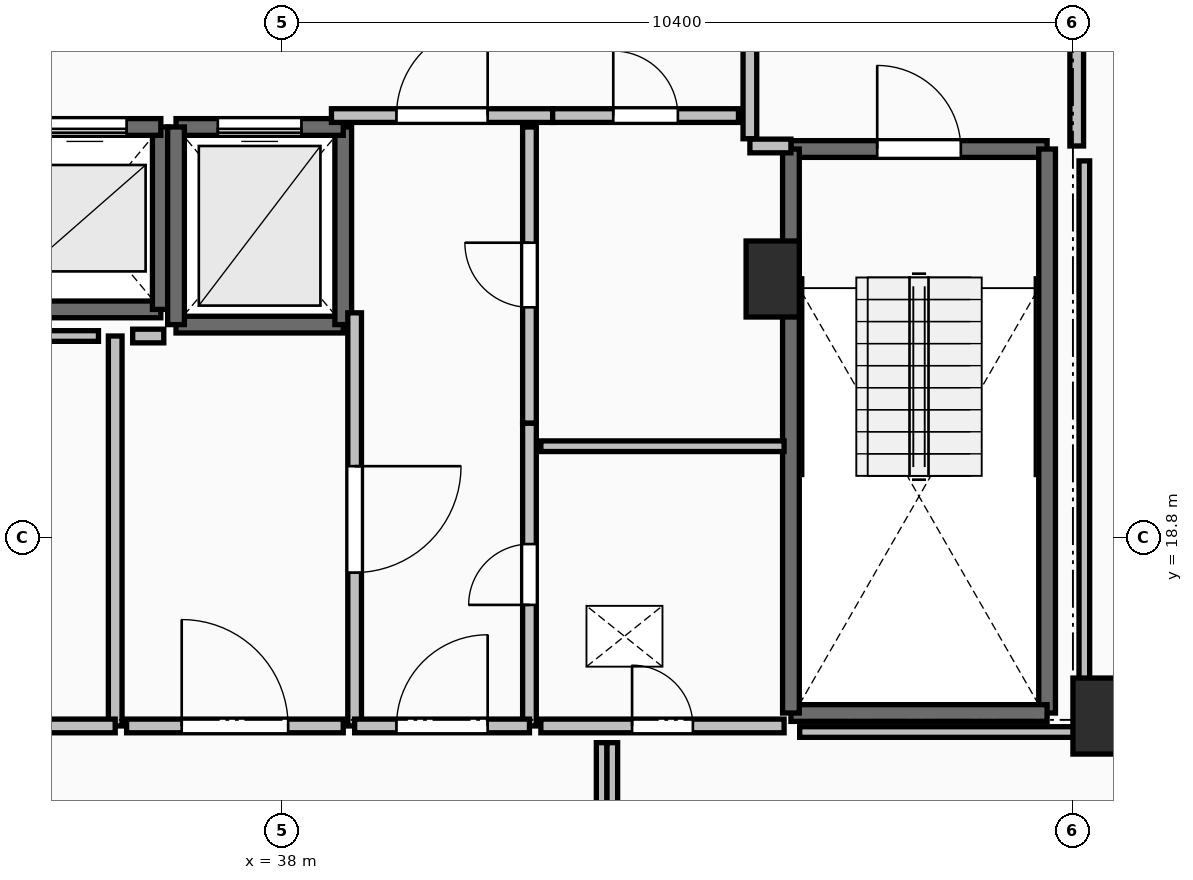
"""IFC4 building model, lengths in metres.
Left out: names, types, materials, properties, quantities, classifications, styles, units other than length and angle.
Written with IfcOpenShell. Run it as: python <this file> out.ifc"""

import sys

from ifc_helpers import new_model, si_unit, direction, frame, frame_2d, origin, origin_2d, place, context, subcontext, project, spatial, rectangle, extrude, element, fill, save


model = new_model("IFC4")
c1 = context("Model", 3, precision=1e-05, world=origin(), true_north=direction((0.0, 1.0)))
c2 = subcontext(c1, "Body", "Model", "MODEL_VIEW")
j1 = project(units=[si_unit("LENGTHUNIT", "METRE"), si_unit("PLANEANGLEUNIT", "RADIAN")], contexts=[c1])
p1 = place(None, origin())
s1 = spatial("IfcSite", under=j1, at=p1, CompositionType="ELEMENT")
p2 = place(p1, origin())
s2 = spatial("IfcBuilding", under=s1, at=p2, CompositionType="ELEMENT")
p3 = place(p2, frame((0.0, 0.0, 193.1)))
s3 = spatial("IfcBuildingStorey", under=s2, at=p3, CompositionType="ELEMENT", Elevation=193.1)
for number, where, z_axis, x_axis in (
    (1, (48.75, 16.45, 0.0), (0.0, 0.0, 1.0), (1.0, 0.0, 0.0)),
    (2, (44.45, 22.2, 0.0), (0.0, 0.0, 1.0), (1.0, 0.0, 0.0)),
):
    element("IfcColumn", number, at=place(p3, frame(where, z_axis=z_axis, x_axis=x_axis)), inside=s3, PredefinedType="PILASTER", context=c2, shape_type="SweptSolid", body=[
        extrude(rectangle(XDim=0.7, YDim=1.0, at=origin_2d()), origin(), (0.0, 0.0, 1.0), 3.5),
    ])
p4 = place(p3, frame((44.69, 23.91, 0.0), z_axis=(0.0, 0.0, 1.0), x_axis=(1.0, 0.0, 0.0)))
e3 = element("IfcWall", 3, at=p4, inside=s3, PredefinedType="SOLIDWALL", context=c2, shape_type="SweptSolid", body=[
    extrude(rectangle(XDim=3.37, YDim=0.22, at=frame_2d((1.685, 0.0))), origin(), (0.0, 0.0, 1.0), 3.24),
])
p5 = place(p4, frame((1.135, 0.0, 0.0)))
e4 = element("IfcOpeningElement", 4, at=p5, cuts=e3, PredefinedType="OPENING", context=c2, shape_type="SweptSolid", body=[
    extrude(rectangle(XDim=1.1, YDim=2.15, at=frame_2d((0.55, 1.075))), frame((0.0, 0.125, 0.0), z_axis=(0.0, -1.0, 0.0), x_axis=(1.0, 0.0, 0.0)), (0.0, 0.0, 1.0), 0.25),
])
p6 = place(p3, frame((48.06, 23.91, 0.0), z_axis=(0.0, 0.0, 1.0), x_axis=(0.0, -1.0, 0.0)))
e5 = element("IfcWall", 5, at=p6, inside=s3, PredefinedType="SOLIDWALL", context=c2, shape_type="SweptSolid", body=[
    extrude(rectangle(XDim=7.42, YDim=0.22, at=frame_2d((3.71, 0.0))), origin(), (0.0, 0.0, 1.0), 3.24),
])
p7 = place(p3, frame((48.06, 16.49, 0.0), z_axis=(0.0, 0.0, 1.0), x_axis=(-1.0, 0.0, 0.0)))
e6 = element("IfcWall", 6, at=p7, inside=s3, PredefinedType="SOLIDWALL", context=c2, shape_type="SweptSolid", body=[
    extrude(rectangle(XDim=3.37, YDim=0.22, at=frame_2d((1.685, 0.0))), origin(), (0.0, 0.0, 1.0), 3.24),
])
p8 = place(p3, frame((44.69, 16.49, 0.0), z_axis=(0.0, 0.0, 1.0), x_axis=(0.0, 1.0, 0.0)))
e7 = element("IfcWall", 7, at=p8, inside=s3, PredefinedType="SOLIDWALL", context=c2, shape_type="SweptSolid", body=[
    extrude(rectangle(XDim=7.42, YDim=0.22, at=frame_2d((3.71, 0.0))), origin(), (0.0, 0.0, 1.0), 3.24),
])
p9 = place(p3, frame((34.4, 21.8, 0.0), z_axis=(0.0, 0.0, 1.0), x_axis=(1.0, 0.0, 0.0)))
e8 = element("IfcWall", 8, at=p9, inside=s3, PredefinedType="SOLIDWALL", context=c2, shape_type="SweptSolid", body=[
    extrude(rectangle(XDim=2.0, YDim=0.22, at=frame_2d((1.0, 0.0))), origin(), (0.0, 0.0, 1.0), 3.24),
])
p10 = place(p3, frame((36.4, 21.8, 0.0), z_axis=(0.0, 0.0, 1.0), x_axis=(0.0, 1.0, 0.0)))
e9 = element("IfcWall", 9, at=p10, inside=s3, PredefinedType="SOLIDWALL", context=c2, shape_type="SweptSolid", body=[
    extrude(rectangle(XDim=2.4, YDim=0.22, at=frame_2d((1.2, 0.0))), origin(), (0.0, 0.0, 1.0), 3.24),
])
p11 = place(p3, frame((36.4, 24.2, 0.0), z_axis=(0.0, 0.0, 1.0), x_axis=(-1.0, 0.0, 0.0)))
e10 = element("IfcWall", 10, at=p11, inside=s3, PredefinedType="SOLIDWALL", context=c2, shape_type="SweptSolid", body=[
    extrude(rectangle(XDim=2.0, YDim=0.22, at=frame_2d((1.0, 0.0))), origin(), (0.0, 0.0, 1.0), 3.24),
])
p12 = place(p11, frame((0.45, 0.0, 0.0)))
e11 = element("IfcOpeningElement", 11, at=p12, cuts=e10, PredefinedType="OPENING", context=c2, shape_type="SweptSolid", body=[
    extrude(rectangle(XDim=1.1, YDim=2.2, at=frame_2d((0.55, 1.1))), frame((0.0, 0.125, 0.0), z_axis=(0.0, -1.0, 0.0), x_axis=(1.0, 0.0, 0.0)), (0.0, 0.0, 1.0), 0.25),
])
p13 = place(p3, frame((36.6, 21.6, 0.0), z_axis=(0.0, 0.0, 1.0), x_axis=(1.0, 0.0, 0.0)))
e12 = element("IfcWall", 12, at=p13, inside=s3, PredefinedType="SOLIDWALL", context=c2, shape_type="SweptSolid", body=[
    extrude(rectangle(XDim=2.2, YDim=0.22, at=frame_2d((1.1, 0.0))), origin(), (0.0, 0.0, 1.0), 3.24),
])
p14 = place(p3, frame((38.8, 21.6, 0.0), z_axis=(0.0, 0.0, 1.0), x_axis=(0.0, 1.0, 0.0)))
e13 = element("IfcWall", 13, at=p14, inside=s3, PredefinedType="SOLIDWALL", context=c2, shape_type="SweptSolid", body=[
    extrude(rectangle(XDim=2.6, YDim=0.22, at=frame_2d((1.3, 0.0))), origin(), (0.0, 0.0, 1.0), 3.24),
])
p15 = place(p3, frame((38.8, 24.2, 0.0), z_axis=(0.0, 0.0, 1.0), x_axis=(-1.0, 0.0, 0.0)))
e14 = element("IfcWall", 14, at=p15, inside=s3, PredefinedType="SOLIDWALL", context=c2, shape_type="SweptSolid", body=[
    extrude(rectangle(XDim=2.2, YDim=0.22, at=frame_2d((1.1, 0.0))), origin(), (0.0, 0.0, 1.0), 3.24),
])
p16 = place(p15, frame((0.55, 0.0, 0.0)))
e15 = element("IfcOpeningElement", 15, at=p16, cuts=e14, PredefinedType="OPENING", context=c2, shape_type="SweptSolid", body=[
    extrude(rectangle(XDim=1.1, YDim=2.2, at=frame_2d((0.55, 1.1))), frame((0.0, 0.125, 0.0), z_axis=(0.0, -1.0, 0.0), x_axis=(1.0, 0.0, 0.0)), (0.0, 0.0, 1.0), 0.25),
])
p17 = place(p3, frame((36.6, 24.2, 0.0), z_axis=(0.0, 0.0, 1.0), x_axis=(0.0, -1.0, 0.0)))
e16 = element("IfcWall", 16, at=p17, inside=s3, PredefinedType="SOLIDWALL", context=c2, shape_type="SweptSolid", body=[
    extrude(rectangle(XDim=2.6, YDim=0.22, at=frame_2d((1.3, 0.0))), origin(), (0.0, 0.0, 1.0), 3.24),
])
p18 = place(p3, frame((44.15, 27.955, 0.0), z_axis=(0.0, 0.0, 1.0), x_axis=(0.0, -1.0, 0.0)))
e17 = element("IfcWall", 17, at=p18, inside=s3, PredefinedType="PARTITIONING", context=c2, shape_type="SweptSolid", body=[
    extrude(rectangle(XDim=3.91, YDim=0.18, at=frame_2d((1.955, 0.0))), origin(), (0.0, 0.0, 1.0), 3.24),
])
p19 = place(p18, frame((1.355, 0.0, 0.0)))
e18 = element("IfcOpeningElement", 18, at=p19, cuts=e17, PredefinedType="OPENING", context=c2, shape_type="SweptSolid", body=[
    extrude(rectangle(XDim=1.2, YDim=2.15, at=frame_2d((0.6, 1.075))), frame((0.0, 0.105, 0.0), z_axis=(0.0, -1.0, 0.0), x_axis=(1.0, 0.0, 0.0)), (0.0, 0.0, 1.0), 0.21),
])
p20 = place(p3, frame((44.15, 23.95, 0.0), z_axis=(0.0, 0.0, 1.0), x_axis=(1.0, 0.0, 0.0)))
e19 = element("IfcWall", 19, at=p20, inside=s3, PredefinedType="PARTITIONING", context=c2, shape_type="SweptSolid", body=[
    extrude(rectangle(XDim=0.54, YDim=0.18, at=frame_2d((0.27, 0.0))), origin(), (0.0, 0.0, 1.0), 3.24),
])
p21 = place(p3, frame((48.45, 23.95, 0.0), z_axis=(0.0, 0.0, 1.0), x_axis=(0.0, 1.0, 0.0)))
e20 = element("IfcWall", 20, at=p21, inside=s3, PredefinedType="PARTITIONING", context=c2, shape_type="SweptSolid", body=[
    extrude(rectangle(XDim=4.05, YDim=0.18, at=frame_2d((2.025, 0.0))), origin(), (0.0, 0.0, 1.0), 3.24),
])
p22 = place(p21, frame((1.425, 0.0, 0.0)))
e21 = element("IfcOpeningElement", 21, at=p22, cuts=e20, PredefinedType="OPENING", context=c2, shape_type="SweptSolid", body=[
    extrude(rectangle(XDim=1.2, YDim=2.15, at=frame_2d((0.6, 1.075))), frame((0.0, 0.105, 0.0), z_axis=(0.0, -1.0, 0.0), x_axis=(1.0, 0.0, 0.0)), (0.0, 0.0, 1.0), 0.21),
])
p23 = place(p3, frame((38.645, 24.35, 0.0), z_axis=(0.0, 0.0, 1.0), x_axis=(1.0, 0.0, 0.0)))
e22 = element("IfcWall", 22, at=p23, inside=s3, PredefinedType="PARTITIONING", context=c2, shape_type="SweptSolid", body=[
    extrude(rectangle(XDim=2.91, YDim=0.18, at=frame_2d((1.455, 0.0))), origin(), (0.0, 0.0, 1.0), 3.24),
])
p24 = place(p23, frame((0.855, 0.0, 0.0)))
e23 = element("IfcOpeningElement", 23, at=p24, cuts=e22, PredefinedType="OPENING", context=c2, shape_type="SweptSolid", body=[
    extrude(rectangle(XDim=1.2, YDim=2.15, at=frame_2d((0.6, 1.075))), frame((0.0, 0.105, 0.0), z_axis=(0.0, -1.0, 0.0), x_axis=(1.0, 0.0, 0.0)), (0.0, 0.0, 1.0), 0.21),
])
p25 = place(p3, frame((41.555, 24.35, 0.0), z_axis=(0.0, 0.0, 1.0), x_axis=(1.0, 0.0, 0.0)))
e24 = element("IfcWall", 24, at=p25, inside=s3, PredefinedType="PARTITIONING", context=c2, shape_type="SweptSolid", body=[
    extrude(rectangle(XDim=2.445, YDim=0.18, at=frame_2d((1.223, 0.0))), origin(), (0.0, 0.0, 1.0), 3.24),
])
p26 = place(p25, frame((0.798, 0.0, 0.0)))
e25 = element("IfcOpeningElement", 25, at=p26, cuts=e24, PredefinedType="OPENING", context=c2, shape_type="SweptSolid", body=[
    extrude(rectangle(XDim=0.85, YDim=2.1, at=frame_2d((0.425, 1.05))), frame((0.0, 0.105, 0.0), z_axis=(0.0, -1.0, 0.0), x_axis=(1.0, 0.0, 0.0)), (0.0, 0.0, 1.0), 0.21),
])
p27 = place(p3, frame((41.25, 16.32, 0.0), z_axis=(0.0, 0.0, 1.0), x_axis=(0.0, 1.0, 0.0)))
e26 = element("IfcWall", 26, at=p27, inside=s3, PredefinedType="PARTITIONING", context=c2, shape_type="SweptSolid", body=[
    extrude(rectangle(XDim=3.985, YDim=0.18, at=frame_2d((1.992, 0.0))), origin(), (0.0, 0.0, 1.0), 3.24),
])
p28 = place(p27, frame((1.593, 0.0, 0.0)))
e27 = element("IfcOpeningElement", 27, at=p28, cuts=e26, PredefinedType="OPENING", context=c2, shape_type="SweptSolid", body=[
    extrude(rectangle(XDim=0.8, YDim=2.05, at=frame_2d((0.4, 1.025))), frame((0.0, 0.105, 0.0), z_axis=(0.0, -1.0, 0.0), x_axis=(1.0, 0.0, 0.0)), (0.0, 0.0, 1.0), 0.21),
])
p29 = place(p3, frame((41.25, 20.305, 0.0), z_axis=(0.0, 0.0, 1.0), x_axis=(0.0, 1.0, 0.0)))
e28 = element("IfcWall", 28, at=p29, inside=s3, PredefinedType="PARTITIONING", context=c2, shape_type="SweptSolid", body=[
    extrude(rectangle(XDim=3.895, YDim=0.18, at=frame_2d((1.948, 0.0))), origin(), (0.0, 0.0, 1.0), 3.24),
])
p30 = place(p29, frame((1.522, 0.0, 0.0)))
e29 = element("IfcOpeningElement", 29, at=p30, cuts=e28, PredefinedType="OPENING", context=c2, shape_type="SweptSolid", body=[
    extrude(rectangle(XDim=0.85, YDim=2.1, at=frame_2d((0.425, 1.05))), frame((0.0, 0.105, 0.0), z_axis=(0.0, -1.0, 0.0), x_axis=(1.0, 0.0, 0.0)), (0.0, 0.0, 1.0), 0.21),
])
p31 = place(p3, frame((38.95, 21.755, 0.0), z_axis=(0.0, 0.0, 1.0), x_axis=(0.0, -1.0, 0.0)))
e30 = element("IfcWall", 30, at=p31, inside=s3, PredefinedType="PARTITIONING", context=c2, shape_type="SweptSolid", body=[
    extrude(rectangle(XDim=5.435, YDim=0.18, at=frame_2d((2.717, 0.0))), origin(), (0.0, 0.0, 1.0), 3.24),
])
p32 = place(p31, frame((2.018, 0.0, 0.0)))
e31 = element("IfcOpeningElement", 31, at=p32, cuts=e30, PredefinedType="OPENING", context=c2, shape_type="SweptSolid", body=[
    extrude(rectangle(XDim=1.4, YDim=2.2, at=frame_2d((0.7, 1.1))), frame((0.0, 0.105, 0.0), z_axis=(0.0, -1.0, 0.0), x_axis=(1.0, 0.0, 0.0)), (0.0, 0.0, 1.0), 0.21),
])
p33 = place(p3, frame((38.95, 16.32, 0.0), z_axis=(0.0, 0.0, 1.0), x_axis=(1.0, 0.0, 0.0)))
e32 = element("IfcWall", 32, at=p33, inside=s3, PredefinedType="PARTITIONING", context=c2, shape_type="SweptSolid", body=[
    extrude(rectangle(XDim=2.3, YDim=0.18, at=frame_2d((1.15, 0.0))), origin(), (0.0, 0.0, 1.0), 3.24),
])
p34 = place(p33, frame((0.55, 0.0, 0.0)))
e33 = element("IfcOpeningElement", 33, at=p34, cuts=e32, PredefinedType="OPENING", context=c2, shape_type="SweptSolid", body=[
    extrude(rectangle(XDim=1.2, YDim=2.15, at=frame_2d((0.6, 1.075))), frame((0.0, 0.105, 0.0), z_axis=(0.0, -1.0, 0.0), x_axis=(1.0, 0.0, 0.0)), (0.0, 0.0, 1.0), 0.21),
])
p35 = place(p3, frame((44.6, 20.0, 0.0), z_axis=(0.0, 0.0, 1.0), x_axis=(-1.0, 0.0, 0.0)))
e34 = element("IfcWall", 34, at=p35, inside=s3, PredefinedType="PARTITIONING", context=c2, shape_type="SweptSolid", body=[
    extrude(rectangle(XDim=3.2, YDim=0.14, at=frame_2d((1.6, 0.0))), origin(), (0.0, 0.0, 1.0), 3.24),
])
p36 = place(p3, frame((41.4, 16.32, 0.0), z_axis=(0.0, 0.0, 1.0), x_axis=(1.0, 0.0, 0.0)))
e35 = element("IfcWall", 35, at=p36, inside=s3, PredefinedType="PARTITIONING", context=c2, shape_type="SweptSolid", body=[
    extrude(rectangle(XDim=3.2, YDim=0.18, at=frame_2d((1.6, 0.0))), origin(), (0.0, 0.0, 1.0), 3.24),
])
p37 = place(p36, frame((1.2, 0.0, 0.0)))
e36 = element("IfcOpeningElement", 36, at=p37, cuts=e35, PredefinedType="OPENING", context=c2, shape_type="SweptSolid", body=[
    extrude(rectangle(XDim=0.8, YDim=2.05, at=frame_2d((0.4, 1.025))), frame((0.0, 0.105, 0.0), z_axis=(0.0, -1.0, 0.0), x_axis=(1.0, 0.0, 0.0)), (0.0, 0.0, 1.0), 0.21),
])
p38 = place(p3, frame((35.8, 16.32, 0.0), z_axis=(0.0, 0.0, 1.0), x_axis=(0.0, 1.0, 0.0)))
e37 = element("IfcWall", 37, at=p38, inside=s3, PredefinedType="PARTITIONING", context=c2, shape_type="SweptSolid", body=[
    extrude(rectangle(XDim=5.13, YDim=0.18, at=frame_2d((2.565, 0.0))), origin(), (0.0, 0.0, 1.0), 3.24),
])
p39 = place(p3, frame((31.4, 16.32, 0.0), z_axis=(0.0, 0.0, 1.0), x_axis=(1.0, 0.0, 0.0)))
e38 = element("IfcWall", 38, at=p39, inside=s3, PredefinedType="PARTITIONING", context=c2, shape_type="SweptSolid", body=[
    extrude(rectangle(XDim=4.4, YDim=0.18, at=frame_2d((2.2, 0.0))), origin(), (0.0, 0.0, 1.0), 3.24),
])
p40 = place(p39, frame((1.775, 0.0, 0.0)))
e39 = element("IfcOpeningElement", 39, at=p40, cuts=e38, PredefinedType="OPENING", context=c2, shape_type="SweptSolid", body=[
    extrude(rectangle(XDim=0.85, YDim=2.1, at=frame_2d((0.425, 1.05))), frame((0.0, 0.105, 0.0), z_axis=(0.0, -1.0, 0.0), x_axis=(1.0, 0.0, 0.0)), (0.0, 0.0, 1.0), 0.21),
])
p41 = place(p3, frame((35.95, 16.32, 0.0), z_axis=(0.0, 0.0, 1.0), x_axis=(1.0, 0.0, 0.0)))
e40 = element("IfcWall", 40, at=p41, inside=s3, PredefinedType="PARTITIONING", context=c2, shape_type="SweptSolid", body=[
    extrude(rectangle(XDim=2.85, YDim=0.18, at=frame_2d((1.425, 0.0))), origin(), (0.0, 0.0, 1.0), 3.24),
])
p42 = place(p41, frame((0.725, 0.0, 0.0)))
e41 = element("IfcOpeningElement", 41, at=p42, cuts=e40, PredefinedType="OPENING", context=c2, shape_type="SweptSolid", body=[
    extrude(rectangle(XDim=1.4, YDim=2.2, at=frame_2d((0.7, 1.1))), frame((0.0, 0.105, 0.0), z_axis=(0.0, -1.0, 0.0), x_axis=(1.0, 0.0, 0.0)), (0.0, 0.0, 1.0), 0.21),
])
p43 = place(p3, frame((35.58, 21.45, 0.0), z_axis=(0.0, 0.0, 1.0), x_axis=(-1.0, 0.0, 0.0)))
e42 = element("IfcWall", 42, at=p43, inside=s3, PredefinedType="PARTITIONING", context=c2, shape_type="SweptSolid", body=[
    extrude(rectangle(XDim=4.05, YDim=0.14, at=frame_2d((2.025, 0.0))), origin(), (0.0, 0.0, 1.0), 3.24),
])
p44 = place(p3, frame((36.439, 21.45, 0.0), z_axis=(0.0, 0.0, 1.0), x_axis=(-1.0, 0.0, 0.0)))
e43 = element("IfcWall", 43, at=p44, inside=s3, PredefinedType="PARTITIONING", context=c2, shape_type="SweptSolid", body=[
    extrude(rectangle(XDim=0.409, YDim=0.18, at=frame_2d((0.205, 0.0))), origin(), (0.0, 0.0, 1.0), 3.24),
])
p45 = place(p3, frame((48.55, 16.24, 0.0), z_axis=(0.0, 0.0, 1.0), x_axis=(0.0, 1.0, 0.0)))
e44 = element("IfcWall", 44, at=p45, inside=s3, PredefinedType="PARTITIONING", context=c2, shape_type="SweptSolid", body=[
    extrude(rectangle(XDim=7.514, YDim=0.14, at=frame_2d((3.757, 0.0))), origin(), (0.0, 0.0, 1.0), 2.432),
])
p46 = place(p3, frame((42.2, 16.1, 0.0), z_axis=(0.0, 0.0, 1.0), x_axis=(0.0, -1.0, 0.0)))
e45 = element("IfcWall", 45, at=p46, inside=s3, PredefinedType="PARTITIONING", context=c2, shape_type="SweptSolid", body=[
    extrude(rectangle(XDim=1.705, YDim=0.14, at=frame_2d((0.853, 0.0))), origin(), (0.0, 0.0, 1.0), 3.24),
])
p47 = place(p3, frame((42.34, 14.384, 0.0), z_axis=(0.0, 0.0, 1.0), x_axis=(0.0, 1.0, 0.0)))
e46 = element("IfcWall", 46, at=p47, inside=s3, PredefinedType="PARTITIONING", context=c2, shape_type="SweptSolid", body=[
    extrude(rectangle(XDim=1.716, YDim=0.14, at=frame_2d((0.858, 0.0))), origin(), (0.0, 0.0, 1.0), 3.24),
])
p48 = place(p3, frame((44.805, 16.24, 0.0), z_axis=(0.0, 0.0, 1.0), x_axis=(1.0, 0.0, 0.0)))
e47 = element("IfcWall", 47, at=p48, inside=s3, PredefinedType="PARTITIONING", context=c2, shape_type="SweptSolid", body=[
    extrude(rectangle(XDim=3.745, YDim=0.14, at=frame_2d((1.873, 0.0))), origin(), (0.0, 0.0, 1.0), 2.432),
])
p49 = place(p5, origin())
e48 = element("IfcDoor", 48, at=p49, inside=s3, OperationType="SINGLE_SWING_LEFT", PredefinedType="DOOR", context=c2, shape_type="SweptSolid", body=[
    extrude(rectangle(XDim=1.1, YDim=2.15, at=frame_2d((0.55, 1.075))), frame((0.0, 0.025, 0.0), z_axis=(0.0, -1.0, 0.0), x_axis=(1.0, 0.0, 0.0)), (0.0, 0.0, 1.0), 0.05),
])
fill(e4, e48)
p50 = place(p12, origin())
e49 = element("IfcDoor", 49, at=p50, inside=s3, OperationType="SLIDING_TO_LEFT", PredefinedType="DOOR", context=c2, shape_type="SweptSolid", body=[
    extrude(rectangle(XDim=1.1, YDim=2.2, at=frame_2d((0.55, 1.1))), frame((0.0, 0.025, 0.0), z_axis=(0.0, -1.0, 0.0), x_axis=(1.0, 0.0, 0.0)), (0.0, 0.0, 1.0), 0.05),
])
fill(e11, e49)
p51 = place(p16, origin())
e50 = element("IfcDoor", 50, at=p51, inside=s3, OperationType="SLIDING_TO_LEFT", PredefinedType="DOOR", context=c2, shape_type="SweptSolid", body=[
    extrude(rectangle(XDim=1.1, YDim=2.2, at=frame_2d((0.55, 1.1))), frame((0.0, 0.025, 0.0), z_axis=(0.0, -1.0, 0.0), x_axis=(1.0, 0.0, 0.0)), (0.0, 0.0, 1.0), 0.05),
])
fill(e15, e50)
p52 = place(p24, origin())
e51 = element("IfcDoor", 51, at=p52, inside=s3, OperationType="SINGLE_SWING_RIGHT", PredefinedType="DOOR", context=c2, shape_type="SweptSolid", body=[
    extrude(rectangle(XDim=1.2, YDim=2.15, at=frame_2d((0.6, 1.075))), frame((0.0, 0.025, 0.0), z_axis=(0.0, -1.0, 0.0), x_axis=(1.0, 0.0, 0.0)), (0.0, 0.0, 1.0), 0.05),
])
fill(e23, e51)
p53 = place(p26, origin())
e52 = element("IfcDoor", 52, at=p53, inside=s3, OperationType="SINGLE_SWING_LEFT", PredefinedType="DOOR", context=c2, shape_type="SweptSolid", body=[
    extrude(rectangle(XDim=0.85, YDim=2.1, at=frame_2d((0.425, 1.05))), frame((0.0, 0.025, 0.0), z_axis=(0.0, -1.0, 0.0), x_axis=(1.0, 0.0, 0.0)), (0.0, 0.0, 1.0), 0.05),
])
fill(e25, e52)
p54 = place(p28, origin())
e53 = element("IfcDoor", 53, at=p54, inside=s3, OperationType="SINGLE_SWING_LEFT", PredefinedType="DOOR", context=c2, shape_type="SweptSolid", body=[
    extrude(rectangle(XDim=0.8, YDim=2.05, at=frame_2d((0.4, 1.025))), frame((0.0, 0.025, 0.0), z_axis=(0.0, -1.0, 0.0), x_axis=(1.0, 0.0, 0.0)), (0.0, 0.0, 1.0), 0.05),
])
fill(e27, e53)
p55 = place(p30, origin())
e54 = element("IfcDoor", 54, at=p55, inside=s3, OperationType="SINGLE_SWING_RIGHT", PredefinedType="DOOR", context=c2, shape_type="SweptSolid", body=[
    extrude(rectangle(XDim=0.85, YDim=2.1, at=frame_2d((0.425, 1.05))), frame((0.0, 0.025, 0.0), z_axis=(0.0, -1.0, 0.0), x_axis=(1.0, 0.0, 0.0)), (0.0, 0.0, 1.0), 0.05),
])
fill(e29, e54)
p56 = place(p32, origin())
e55 = element("IfcDoor", 55, at=p56, inside=s3, OperationType="DOUBLE_SWING_LEFT", PredefinedType="DOOR", context=c2, shape_type="SweptSolid", body=[
    extrude(rectangle(XDim=1.4, YDim=2.2, at=frame_2d((0.7, 1.1))), frame((0.0, 0.025, 0.0), z_axis=(0.0, -1.0, 0.0), x_axis=(1.0, 0.0, 0.0)), (0.0, 0.0, 1.0), 0.05),
])
fill(e31, e55)
p57 = place(p34, origin())
e56 = element("IfcDoor", 56, at=p57, inside=s3, OperationType="SINGLE_SWING_RIGHT", PredefinedType="DOOR", context=c2, shape_type="SweptSolid", body=[
    extrude(rectangle(XDim=1.2, YDim=2.15, at=frame_2d((0.6, 1.075))), frame((0.0, 0.025, 0.0), z_axis=(0.0, -1.0, 0.0), x_axis=(1.0, 0.0, 0.0)), (0.0, 0.0, 1.0), 0.05),
])
fill(e33, e56)
p58 = place(p37, origin())
e57 = element("IfcDoor", 57, at=p58, inside=s3, OperationType="SINGLE_SWING_LEFT", PredefinedType="DOOR", context=c2, shape_type="SweptSolid", body=[
    extrude(rectangle(XDim=0.8, YDim=2.05, at=frame_2d((0.4, 1.025))), frame((0.0, 0.025, 0.0), z_axis=(0.0, -1.0, 0.0), x_axis=(1.0, 0.0, 0.0)), (0.0, 0.0, 1.0), 0.05),
])
fill(e36, e57)
p59 = place(p42, origin())
e58 = element("IfcDoor", 58, at=p59, inside=s3, OperationType="DOUBLE_SWING_LEFT", PredefinedType="DOOR", context=c2, shape_type="SweptSolid", body=[
    extrude(rectangle(XDim=1.4, YDim=2.2, at=frame_2d((0.7, 1.1))), frame((0.0, 0.025, 0.0), z_axis=(0.0, -1.0, 0.0), x_axis=(1.0, 0.0, 0.0)), (0.0, 0.0, 1.0), 0.05),
])
fill(e41, e58)
save(model, sys.argv[1])
